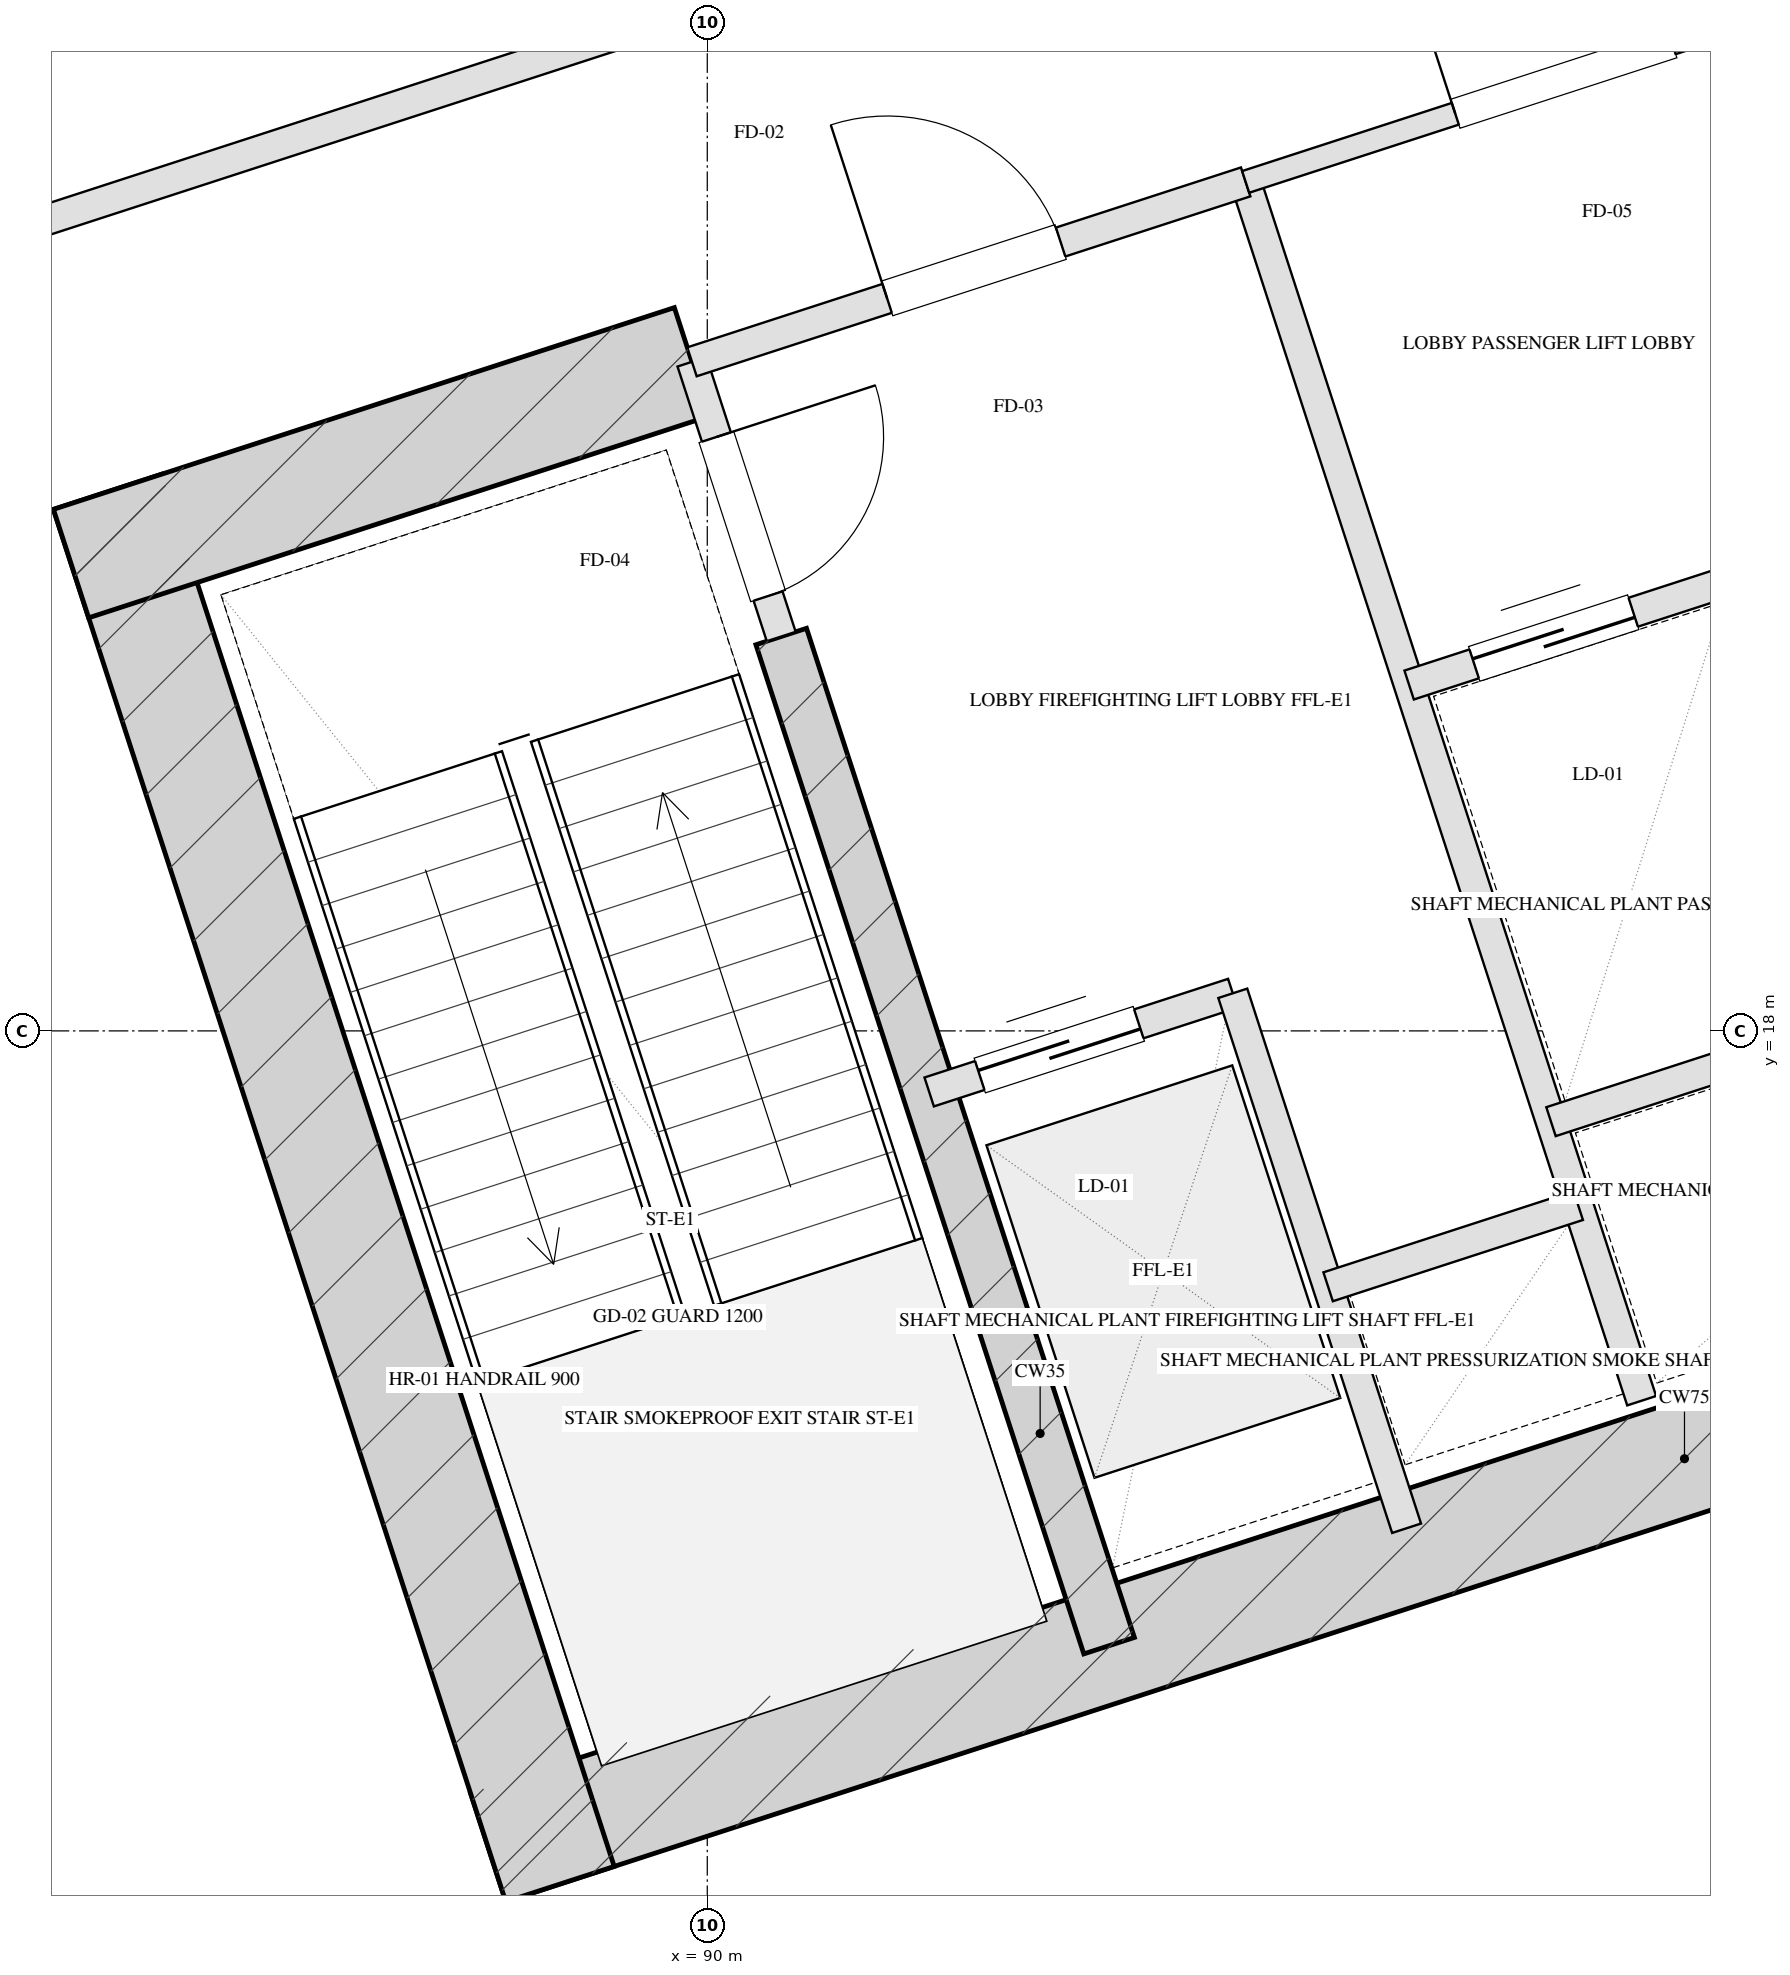
"""IFC4 building model, lengths in metres.
Left out: names, types, materials, properties, quantities, classifications, styles, units other than length and angle.
Written with IfcOpenShell. Run it as: python <this file> out.ifc"""

import sys

from ifc_helpers import new_model, si_unit, direction, frame, frame_2d, origin, place, context, subcontext, project, spatial, rectangle, extrude, element, fill, save


model = new_model("IFC4")
c1 = context("Model", 3, precision=1e-05, world=origin(), true_north=direction((0.0, 1.0)))
c2 = subcontext(c1, "Body", "Model", "MODEL_VIEW")
j1 = project(units=[si_unit("LENGTHUNIT", "METRE"), si_unit("PLANEANGLEUNIT", "RADIAN")], contexts=[c1])
p1 = place(None, origin())
s1 = spatial("IfcSite", under=j1, at=p1, CompositionType="ELEMENT")
p2 = place(p1, origin())
s2 = spatial("IfcBuilding", under=s1, at=p2, CompositionType="ELEMENT")
p3 = place(p2, frame((0.0, 0.0, 92.0)))
s3 = spatial("IfcBuildingStorey", under=s2, at=p3, CompositionType="ELEMENT", Elevation=92.0)
p4 = place(p3, frame((88.559, 12.629, 0.0), z_axis=(0.0, 0.0, 1.0), x_axis=(0.951056072937, 0.309018358888, 0.0)))
e1 = element("IfcWall", 1, at=p4, inside=s3, PredefinedType="SHEAR", context=c2, shape_type="SweptSolid", body=[
    extrude(rectangle(XDim=16.55, YDim=0.75, at=frame_2d((8.275, 0.0))), origin(), (0.0, 0.0, 1.0), 4.6),
])
p5 = place(p3, frame((86.055, 21.546, 0.0), z_axis=(0.0, 0.0, 1.0), x_axis=(0.309023585745, -0.951054374604, 0.0)))
e2 = element("IfcWall", 2, at=p5, inside=s3, PredefinedType="SHEAR", context=c2, shape_type="SweptSolid", body=[
    extrude(rectangle(XDim=9.63, YDim=0.75, at=frame_2d((4.815, 0.0))), origin(), (0.0, 0.0, 1.0), 4.6),
])
p6 = place(p3, frame((90.486, 20.594, 0.0), z_axis=(0.0, 0.0, 1.0), x_axis=(0.309020428229, -0.951055400562, 0.0)))
e3 = element("IfcWall", 3, at=p6, inside=s3, PredefinedType="SHEAR", context=c2, shape_type="SweptSolid", body=[
    extrude(rectangle(XDim=6.98, YDim=0.35, at=frame_2d((3.49, 0.0))), origin(), (0.0, 0.0, 1.0), 4.6),
])
p7 = place(p3, frame((85.814, 21.074, 0.0), z_axis=(0.0, 0.0, 1.0), x_axis=(0.95106580992, 0.308988390074, 0.0)))
e4 = element("IfcWall", 4, at=p7, inside=s3, PredefinedType="SHEAR", context=c2, shape_type="SweptSolid", body=[
    extrude(rectangle(XDim=4.295, YDim=0.75, at=frame_2d((2.147, 0.0))), origin(), (0.0, 0.0, 1.0), 4.6),
])
p8 = place(p3, frame((111.953, 14.005, 0.0), z_axis=(0.0, 0.0, 1.0), x_axis=(-0.95105505922, -0.309021478754, 0.0)))
e5 = element("IfcWall", 5, at=p8, inside=s3, PredefinedType="SOLIDWALL", context=c2, shape_type="SweptSolid", body=[
    extrude(rectangle(XDim=29.4, YDim=0.4, at=frame_2d((14.7, 0.0))), origin(), (0.0, 0.0, 1.0), 3.7),
])
p9 = place(p3, frame((89.899, 22.401, 0.0), z_axis=(0.0, 0.0, 1.0), x_axis=(0.308932062672, -0.951084108086, 0.0)))
e6 = element("IfcWall", 6, at=p9, inside=s3, PredefinedType="PARTITIONING", context=c2, shape_type="SweptSolid", body=[
    extrude(rectangle(XDim=1.9, YDim=0.2, at=frame_2d((0.95, 0.0))), origin(), (0.0, 0.0, 1.0), 4.305),
])
p10 = place(p9, frame((0.52, 0.0, 0.0)))
e7 = element("IfcOpeningElement", 7, at=p10, cuts=e6, PredefinedType="OPENING", context=c2, shape_type="SweptSolid", body=[
    extrude(rectangle(XDim=1.1, YDim=2.05, at=frame_2d((0.55, 1.025))), frame((0.0, 0.11, 0.0), z_axis=(0.0, -1.0, 0.0), x_axis=(1.0, 0.0, 0.0)), (0.0, 0.0, 1.0), 0.22),
])
p11 = place(p3, frame((93.542, 23.585, 0.0), z_axis=(0.0, 0.0, 1.0), x_axis=(0.309042196757, -0.951048327176, 0.0)))
e8 = element("IfcWall", 8, at=p11, inside=s3, PredefinedType="PARTITIONING", context=c2, shape_type="SweptSolid", body=[
    extrude(rectangle(XDim=8.43, YDim=0.2, at=frame_2d((4.215, 0.0))), origin(), (0.0, 0.0, 1.0), 4.305),
])
p12 = place(p3, frame((89.899, 22.401, 0.0), z_axis=(0.0, 0.0, 1.0), x_axis=(0.951046716504, 0.309047153403, 0.0)))
e9 = element("IfcWall", 9, at=p12, inside=s3, PredefinedType="PARTITIONING", context=c2, shape_type="SweptSolid", body=[
    extrude(rectangle(XDim=3.83, YDim=0.2, at=frame_2d((1.915, 0.0))), origin(), (0.0, 0.0, 1.0), 4.305),
])
p13 = place(p12, frame((1.35, 0.0, 0.0)))
e10 = element("IfcOpeningElement", 10, at=p13, cuts=e9, PredefinedType="OPENING", context=c2, shape_type="SweptSolid", body=[
    extrude(rectangle(XDim=1.2, YDim=2.05, at=frame_2d((0.6, 1.025))), frame((0.0, 0.11, 0.0), z_axis=(0.0, -1.0, 0.0), x_axis=(1.0, 0.0, 0.0)), (0.0, 0.0, 1.0), 0.22),
])
p14 = place(p3, frame((91.46, 17.598, 0.0), z_axis=(0.0, 0.0, 1.0), x_axis=(0.951062257173, 0.308999325213, 0.0)))
e11 = element("IfcWall", 11, at=p14, inside=s3, PredefinedType="PARTITIONING", context=c2, shape_type="SweptSolid", body=[
    extrude(rectangle(XDim=2.1, YDim=0.2, at=frame_2d((1.05, 0.0))), origin(), (0.0, 0.0, 1.0), 4.305),
])
p15 = place(p14, frame((0.35, 0.0, 0.0)))
e12 = element("IfcOpeningElement", 12, at=p15, cuts=e11, PredefinedType="OPENING", context=c2, shape_type="SweptSolid", body=[
    extrude(rectangle(XDim=1.1, YDim=2.05, at=frame_2d((0.55, 1.025))), frame((0.0, 0.11, 0.0), z_axis=(0.0, -1.0, 0.0), x_axis=(1.0, 0.0, 0.0)), (0.0, 0.0, 1.0), 0.22),
])
p16 = place(p3, frame((93.457, 18.247, 0.0), z_axis=(0.0, 0.0, 1.0), x_axis=(0.3089935693, -0.951064127245, 0.0)))
e13 = element("IfcWall", 13, at=p16, inside=s3, PredefinedType="PARTITIONING", context=c2, shape_type="SweptSolid", body=[
    extrude(rectangle(XDim=3.7, YDim=0.2, at=frame_2d((1.85, 0.0))), origin(), (0.0, 0.0, 1.0), 4.305),
])
p17 = place(p3, frame((94.084, 16.317, 0.0), z_axis=(0.0, 0.0, 1.0), x_axis=(0.951041328149, 0.309063734775, 0.0)))
e14 = element("IfcWall", 14, at=p17, inside=s3, PredefinedType="PARTITIONING", context=c2, shape_type="SweptSolid", body=[
    extrude(rectangle(XDim=1.73, YDim=0.2, at=frame_2d((0.865, 0.0))), origin(), (0.0, 0.0, 1.0), 4.305),
])
p18 = place(p3, frame((93.542, 23.585, 0.0), z_axis=(0.0, 0.0, 1.0), x_axis=(0.951063829732, 0.308994485023, 0.0)))
e15 = element("IfcWall", 15, at=p18, inside=s3, PredefinedType="PARTITIONING", context=c2, shape_type="SweptSolid", body=[
    extrude(rectangle(XDim=4.4, YDim=0.15, at=frame_2d((2.2, 0.0))), origin(), (0.0, 0.0, 1.0), 4.305),
])
p19 = place(p18, frame((1.45, 0.0, 0.0)))
e16 = element("IfcOpeningElement", 16, at=p19, cuts=e15, PredefinedType="OPENING", context=c2, shape_type="SweptSolid", body=[
    extrude(rectangle(XDim=1.5, YDim=2.05, at=frame_2d((0.75, 1.025))), frame((0.0, 0.085, 0.0), z_axis=(0.0, -1.0, 0.0), x_axis=(1.0, 0.0, 0.0)), (0.0, 0.0, 1.0), 0.17),
])
p20 = place(p3, frame((94.617, 20.275, 0.0), z_axis=(0.0, 0.0, 1.0), x_axis=(0.951058531764, 0.30901079133, 0.0)))
e17 = element("IfcWall", 17, at=p20, inside=s3, PredefinedType="PARTITIONING", context=c2, shape_type="SweptSolid", body=[
    extrude(rectangle(XDim=4.4, YDim=0.2, at=frame_2d((2.2, 0.0))), origin(), (0.0, 0.0, 1.0), 4.305),
])
p21 = place(p20, frame((0.45, 0.0, 0.0)))
e18 = element("IfcOpeningElement", 18, at=p21, cuts=e17, PredefinedType="OPENING", context=c2, shape_type="SweptSolid", body=[
    extrude(rectangle(XDim=1.1, YDim=2.05, at=frame_2d((0.55, 1.025))), frame((0.0, 0.11, 0.0), z_axis=(0.0, -1.0, 0.0), x_axis=(1.0, 0.0, 0.0)), (0.0, 0.0, 1.0), 0.22),
])
p22 = place(p20, frame((2.55, 0.0, 0.0)))
e19 = element("IfcOpeningElement", 19, at=p22, cuts=e17, PredefinedType="OPENING", context=c2, shape_type="SweptSolid", body=[
    extrude(rectangle(XDim=1.1, YDim=2.05, at=frame_2d((0.55, 1.025))), frame((0.0, 0.11, 0.0), z_axis=(0.0, -1.0, 0.0), x_axis=(1.0, 0.0, 0.0)), (0.0, 0.0, 1.0), 0.22),
])
p23 = place(p3, frame((95.551, 17.403, 0.0), z_axis=(0.0, 0.0, 1.0), x_axis=(0.951058531764, 0.30901079133, 0.0)))
e20 = element("IfcWall", 20, at=p23, inside=s3, PredefinedType="PARTITIONING", context=c2, shape_type="SweptSolid", body=[
    extrude(rectangle(XDim=4.4, YDim=0.2, at=frame_2d((2.2, 0.0))), origin(), (0.0, 0.0, 1.0), 4.305),
])
p24 = place(p3, frame((76.456, 20.346, 0.0), z_axis=(0.0, 0.0, 1.0), x_axis=(0.951057423626, 0.309014201884, 0.0)))
e21 = element("IfcWall", 21, at=p24, inside=s3, PredefinedType="PARTITIONING", context=c2, shape_type="SweptSolid", body=[
    extrude(rectangle(XDim=15.9, YDim=0.2, at=frame_2d((7.95, 0.0))), origin(), (0.0, 0.0, 1.0), 3.515),
])
p25 = place(p24, frame((13.7, 0.0, 0.0)))
e22 = element("IfcOpeningElement", 22, at=p25, cuts=e21, PredefinedType="OPENING", context=c2, shape_type="SweptSolid", body=[
    extrude(rectangle(XDim=1.5, YDim=2.05, at=frame_2d((0.75, 1.025))), frame((0.0, 0.11, 0.0), z_axis=(0.0, -1.0, 0.0), x_axis=(1.0, 0.0, 0.0)), (0.0, 0.0, 1.0), 0.22),
])
p26 = place(p10, origin())
e23 = element("IfcDoor", 23, at=p26, inside=s3, OperationType="SINGLE_SWING_LEFT", PredefinedType="DOOR", context=c2, shape_type="SweptSolid", body=[
    extrude(rectangle(XDim=1.1, YDim=2.05, at=frame_2d((0.55, 1.025))), frame((0.0, 0.025, 0.0), z_axis=(0.0, -1.0, 0.0), x_axis=(1.0, 0.0, 0.0)), (0.0, 0.0, 1.0), 0.05),
])
fill(e7, e23)
p27 = place(p13, origin())
e24 = element("IfcDoor", 24, at=p27, inside=s3, OperationType="SINGLE_SWING_LEFT", PredefinedType="DOOR", context=c2, shape_type="SweptSolid", body=[
    extrude(rectangle(XDim=1.2, YDim=2.05, at=frame_2d((0.6, 1.025))), frame((0.0, 0.025, 0.0), z_axis=(0.0, -1.0, 0.0), x_axis=(1.0, 0.0, 0.0)), (0.0, 0.0, 1.0), 0.05),
])
fill(e10, e24)
p28 = place(p15, origin())
e25 = element("IfcDoor", 25, at=p28, inside=s3, OperationType="DOUBLE_DOOR_SLIDING", PredefinedType="DOOR", context=c2, shape_type="SweptSolid", body=[
    extrude(rectangle(XDim=1.1, YDim=2.05, at=frame_2d((0.55, 1.025))), frame((0.0, 0.025, 0.0), z_axis=(0.0, -1.0, 0.0), x_axis=(1.0, 0.0, 0.0)), (0.0, 0.0, 1.0), 0.05),
])
fill(e12, e25)
p29 = place(p19, origin())
e26 = element("IfcDoor", 26, at=p29, inside=s3, OperationType="SINGLE_SWING_LEFT", PredefinedType="DOOR", context=c2, shape_type="SweptSolid", body=[
    extrude(rectangle(XDim=1.5, YDim=2.05, at=frame_2d((0.75, 1.025))), frame((0.0, 0.025, 0.0), z_axis=(0.0, -1.0, 0.0), x_axis=(1.0, 0.0, 0.0)), (0.0, 0.0, 1.0), 0.05),
])
fill(e16, e26)
p30 = place(p21, origin())
e27 = element("IfcDoor", 27, at=p30, inside=s3, OperationType="DOUBLE_DOOR_SLIDING", PredefinedType="DOOR", context=c2, shape_type="SweptSolid", body=[
    extrude(rectangle(XDim=1.1, YDim=2.05, at=frame_2d((0.55, 1.025))), frame((0.0, 0.025, 0.0), z_axis=(0.0, -1.0, 0.0), x_axis=(1.0, 0.0, 0.0)), (0.0, 0.0, 1.0), 0.05),
])
fill(e18, e27)
save(model, sys.argv[1])
